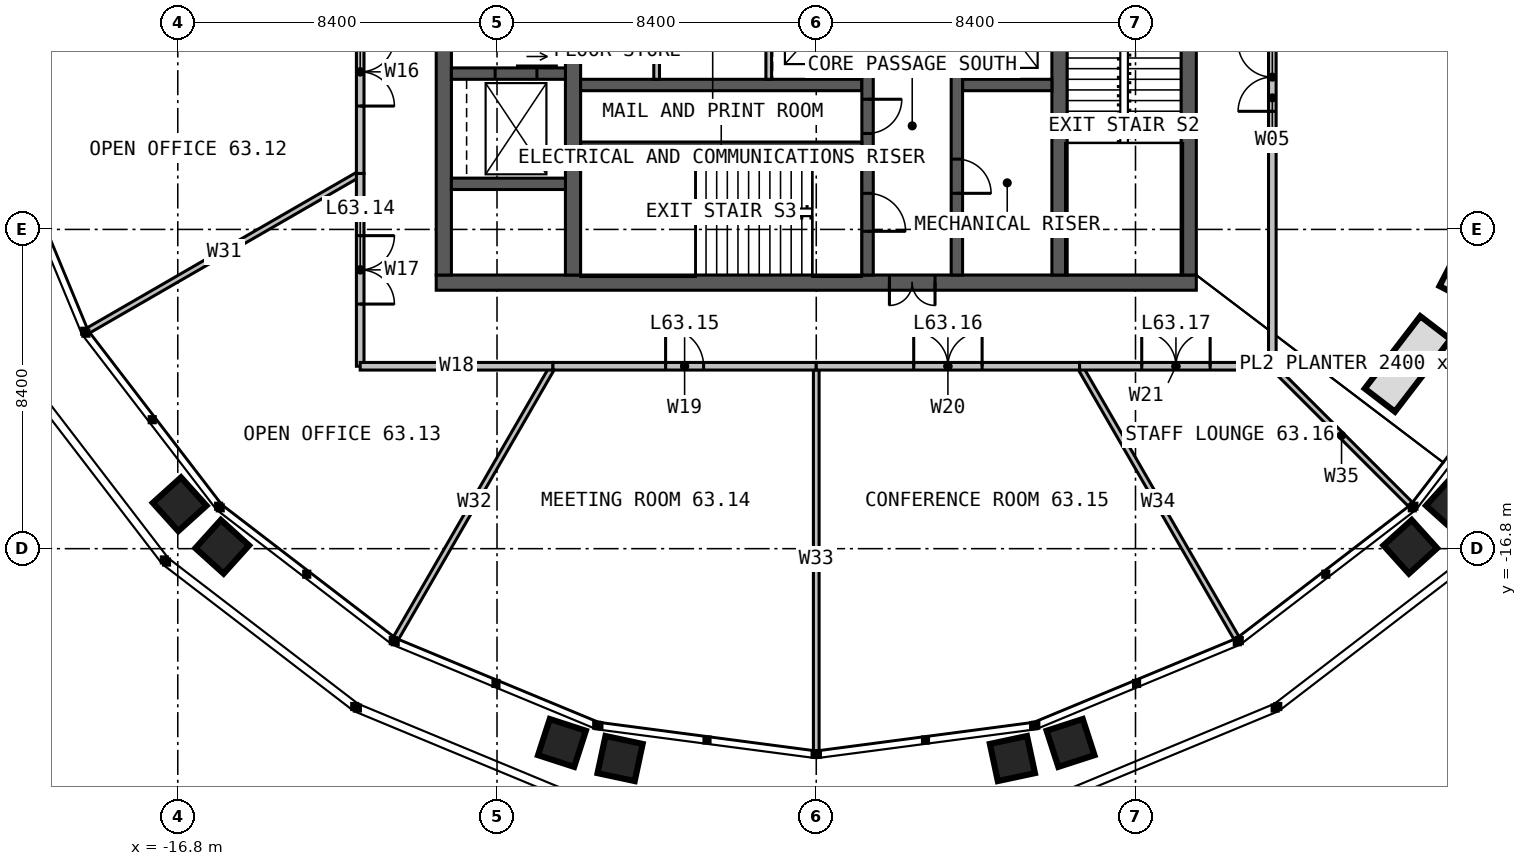
"""IFC4 building model, lengths in metres.
Left out: names, types, materials, properties, quantities, classifications, styles, units other than length and angle.
Written with IfcOpenShell. Run it as: python <this file> out.ifc"""

import sys

from ifc_helpers import new_model, si_unit, direction, frame, frame_2d, origin, place, context, subcontext, project, spatial, rectangle, extrude, element, fill, save


model = new_model("IFC4")
c1 = context("Model", 3, precision=1e-05, world=origin(), true_north=direction((0.0, 1.0)))
c2 = subcontext(c1, "Body", "Model", "MODEL_VIEW")
j1 = project(units=[si_unit("LENGTHUNIT", "METRE"), si_unit("PLANEANGLEUNIT", "RADIAN")], contexts=[c1])
p1 = place(None, origin())
s1 = spatial("IfcSite", under=j1, at=p1, CompositionType="ELEMENT")
p2 = place(p1, origin())
s2 = spatial("IfcBuilding", under=s1, at=p2, CompositionType="ELEMENT")
p3 = place(p2, frame((0.0, 0.0, 260.0)))
s3 = spatial("IfcBuildingStorey", under=s2, at=p3, CompositionType="ELEMENT", Elevation=260.0)
p4 = place(p3, frame((10.0, -9.8, 0.0), z_axis=(0.0, 0.0, 1.0), x_axis=(-1.0, 0.0, 0.0)))
e1 = element("IfcWall", 1, at=p4, inside=s3, PredefinedType="SOLIDWALL", context=c2, shape_type="SweptSolid", body=[
    extrude(rectangle(XDim=20.0, YDim=0.4, at=frame_2d((10.0, 0.0))), origin(), (0.0, 0.0, 1.0), 4.0),
])
p5 = place(p4, frame((6.875, 0.0, 0.0)))
e2 = element("IfcOpeningElement", 2, at=p5, cuts=e1, PredefinedType="OPENING", context=c2, shape_type="SweptSolid", body=[
    extrude(rectangle(XDim=1.2, YDim=2.2, at=frame_2d((0.6, 1.1))), frame((0.0, 0.21, 0.0), z_axis=(0.0, -1.0, 0.0), x_axis=(1.0, 0.0, 0.0)), (0.0, 0.0, 1.0), 0.42),
])
for number, where, z_axis, x_axis in (
    (3, (9.8, -9.6, 0.0), (0.0, 0.0, 1.0), (0.0, 1.0, 0.0)),
    (4, (-9.8, 9.6, 0.0), (0.0, 0.0, 1.0), (0.0, -1.0, 0.0)),
):
    element("IfcWall", number, at=place(p3, frame(where, z_axis=z_axis, x_axis=x_axis)), inside=s3, PredefinedType="SOLIDWALL", context=c2, shape_type="SweptSolid", body=[
        extrude(rectangle(XDim=19.2, YDim=0.4, at=frame_2d((9.6, 0.0))), origin(), (0.0, 0.0, 1.0), 4.0),
    ])
p6 = place(p3, frame((-6.4, -9.6, 0.0), z_axis=(0.0, 0.0, 1.0), x_axis=(0.0, 1.0, 0.0)))
e5 = element("IfcWall", 5, at=p6, inside=s3, PredefinedType="SOLIDWALL", context=c2, shape_type="SweptSolid", body=[
    extrude(rectangle(XDim=19.2, YDim=0.4, at=frame_2d((9.6, 0.0))), origin(), (0.0, 0.0, 1.0), 4.0),
])
p7 = place(p6, frame((9.1, 0.0, 0.0)))
e6 = element("IfcOpeningElement", 6, at=p7, cuts=e5, PredefinedType="OPENING", context=c2, shape_type="SweptSolid", body=[
    extrude(rectangle(XDim=1.0, YDim=2.2, at=frame_2d((0.5, 1.1))), frame((0.0, 0.21, 0.0), z_axis=(0.0, -1.0, 0.0), x_axis=(1.0, 0.0, 0.0)), (0.0, 0.0, 1.0), 0.42),
])
p8 = place(p3, frame((6.4, 9.6, 0.0), z_axis=(0.0, 0.0, 1.0), x_axis=(0.0, -1.0, 0.0)))
e7 = element("IfcWall", 7, at=p8, inside=s3, PredefinedType="SOLIDWALL", context=c2, shape_type="SweptSolid", body=[
    extrude(rectangle(XDim=19.2, YDim=0.4, at=frame_2d((9.6, 0.0))), origin(), (0.0, 0.0, 1.0), 4.0),
])
p9 = place(p8, frame((9.1, 0.0, 0.0)))
e8 = element("IfcOpeningElement", 8, at=p9, cuts=e7, PredefinedType="OPENING", context=c2, shape_type="SweptSolid", body=[
    extrude(rectangle(XDim=1.0, YDim=2.2, at=frame_2d((0.5, 1.1))), frame((0.0, 0.21, 0.0), z_axis=(0.0, -1.0, 0.0), x_axis=(1.0, 0.0, 0.0)), (0.0, 0.0, 1.0), 0.42),
])
p10 = place(p3, frame((-6.2, -4.6, 0.0), z_axis=(0.0, 0.0, 1.0), x_axis=(1.0, 0.0, 0.0)))
e9 = element("IfcWall", 9, at=p10, inside=s3, PredefinedType="SOLIDWALL", context=c2, shape_type="SweptSolid", body=[
    extrude(rectangle(XDim=7.4, YDim=0.3, at=frame_2d((3.7, 0.0))), origin(), (0.0, 0.0, 1.0), 4.0),
])
p11 = place(p3, frame((3.85, -4.6, 0.0), z_axis=(0.0, 0.0, 1.0), x_axis=(1.0, 0.0, 0.0)))
e10 = element("IfcWall", 10, at=p11, inside=s3, PredefinedType="SOLIDWALL", context=c2, shape_type="SweptSolid", body=[
    extrude(rectangle(XDim=2.35, YDim=0.3, at=frame_2d((1.175, 0.0))), origin(), (0.0, 0.0, 1.0), 4.0),
])
p12 = place(p3, frame((1.35, -1.45, 0.0), z_axis=(0.0, 0.0, 1.0), x_axis=(0.0, -1.0, 0.0)))
e11 = element("IfcWall", 11, at=p12, inside=s3, PredefinedType="SOLIDWALL", context=c2, shape_type="SweptSolid", body=[
    extrude(rectangle(XDim=8.15, YDim=0.3, at=frame_2d((4.075, 0.0))), origin(), (0.0, 0.0, 1.0), 4.0),
])
p13 = place(p12, frame((6.0, 0.0, 0.0)))
e12 = element("IfcOpeningElement", 12, at=p13, cuts=e11, PredefinedType="OPENING", context=c2, shape_type="SweptSolid", body=[
    extrude(rectangle(XDim=1.0, YDim=2.2, at=frame_2d((0.5, 1.1))), frame((0.0, 0.16, 0.0), z_axis=(0.0, -1.0, 0.0), x_axis=(1.0, 0.0, 0.0)), (0.0, 0.0, 1.0), 0.32),
])
p14 = place(p12, frame((3.525, 0.0, 0.0)))
e13 = element("IfcOpeningElement", 13, at=p14, cuts=e11, PredefinedType="OPENING", context=c2, shape_type="SweptSolid", body=[
    extrude(rectangle(XDim=0.9, YDim=2.2, at=frame_2d((0.45, 1.1))), frame((0.0, 0.16, 0.0), z_axis=(0.0, -1.0, 0.0), x_axis=(1.0, 0.0, 0.0)), (0.0, 0.0, 1.0), 0.32),
])
p15 = place(p3, frame((3.7, -1.45, 0.0), z_axis=(0.0, 0.0, 1.0), x_axis=(0.0, -1.0, 0.0)))
e14 = element("IfcWall", 14, at=p15, inside=s3, PredefinedType="SOLIDWALL", context=c2, shape_type="SweptSolid", body=[
    extrude(rectangle(XDim=8.15, YDim=0.3, at=frame_2d((4.075, 0.0))), origin(), (0.0, 0.0, 1.0), 4.0),
])
p16 = place(p15, frame((5.1, 0.0, 0.0)))
e15 = element("IfcOpeningElement", 15, at=p16, cuts=e14, PredefinedType="OPENING", context=c2, shape_type="SweptSolid", body=[
    extrude(rectangle(XDim=0.9, YDim=2.2, at=frame_2d((0.45, 1.1))), frame((0.0, 0.16, 0.0), z_axis=(0.0, -1.0, 0.0), x_axis=(1.0, 0.0, 0.0)), (0.0, 0.0, 1.0), 0.32),
])
p17 = place(p3, frame((-6.2, -6.2, 0.0), z_axis=(0.0, 0.0, 1.0), x_axis=(1.0, 0.0, 0.0)))
e16 = element("IfcWall", 16, at=p17, inside=s3, PredefinedType="SOLIDWALL", context=c2, shape_type="SweptSolid", body=[
    extrude(rectangle(XDim=7.4, YDim=0.2, at=frame_2d((3.7, 0.0))), origin(), (0.0, 0.0, 1.0), 4.0),
])
p18 = place(p3, frame((-9.6, -4.3, 0.0), z_axis=(0.0, 0.0, 1.0), x_axis=(1.0, 0.0, 0.0)))
e17 = element("IfcWall", 17, at=p18, inside=s3, PredefinedType="SOLIDWALL", context=c2, shape_type="SweptSolid", body=[
    extrude(rectangle(XDim=3.0, YDim=0.3, at=frame_2d((1.5, 0.0))), origin(), (0.0, 0.0, 1.0), 4.0),
])
p19 = place(p18, frame((1.15, 0.0, 0.0)))
e18 = element("IfcOpeningElement", 18, at=p19, cuts=e17, PredefinedType="OPENING", context=c2, shape_type="SweptSolid", body=[
    extrude(rectangle(XDim=1.1, YDim=2.2, at=frame_2d((0.55, 1.1))), frame((0.0, 0.16, 0.0), z_axis=(0.0, -1.0, 0.0), x_axis=(1.0, 0.0, 0.0)), (0.0, 0.0, 1.0), 0.32),
])
p20 = place(p3, frame((-9.6, -7.2, 0.0), z_axis=(0.0, 0.0, 1.0), x_axis=(1.0, 0.0, 0.0)))
e19 = element("IfcWall", 19, at=p20, inside=s3, PredefinedType="SOLIDWALL", context=c2, shape_type="SweptSolid", body=[
    extrude(rectangle(XDim=3.0, YDim=0.3, at=frame_2d((1.5, 0.0))), origin(), (0.0, 0.0, 1.0), 4.0),
])
for number, where, z_axis, x_axis in (
    (20, (-4.2, -1.75, 0.0), (0.0, 0.0, 1.0), (0.0, -1.0, 0.0)),
    (21, (-1.25, -1.75, 0.0), (0.0, 0.0, 1.0), (0.0, -1.0, 0.0)),
):
    element("IfcWall", number, at=place(p3, frame(where, z_axis=z_axis, x_axis=x_axis)), inside=s3, PredefinedType="PARTITIONING", context=c2, shape_type="SweptSolid", body=[
        extrude(rectangle(XDim=2.7, YDim=0.15, at=frame_2d((1.35, 0.0))), origin(), (0.0, 0.0, 1.0), 3.75),
    ])
p21 = place(p3, frame((12.0, -12.0, 0.0), z_axis=(0.0, 0.0, 1.0), x_axis=(0.707106781187, -0.707106781187, 0.0)))
e22 = element("IfcWall", 22, at=p21, inside=s3, PredefinedType="PARTITIONING", context=c2, shape_type="SweptSolid", body=[
    extrude(rectangle(XDim=5.152, YDim=0.15, at=frame_2d((2.576, 0.0))), origin(), (0.0, 0.0, 1.0), 2.79),
])
for number, where, z_axis, x_axis in (
    (23, (-12.0, -6.928, 0.0), (0.0, 0.0, 1.0), (-0.866, -0.5, 0.0)),
    (24, (-6.928, -12.0, 0.0), (0.0, 0.0, 1.0), (-0.5, -0.866, 0.0)),
):
    element("IfcWall", number, at=place(p3, frame(where, z_axis=z_axis, x_axis=x_axis)), inside=s3, PredefinedType="PARTITIONING", context=c2, shape_type="SweptSolid", body=[
        extrude(rectangle(XDim=8.266, YDim=0.15, at=frame_2d((4.133, 0.0))), origin(), (0.0, 0.0, 1.0), 2.79),
    ])
p22 = place(p3, frame((0.0, -12.0, 0.0), z_axis=(0.0, 0.0, 1.0), x_axis=(0.0, -1.0, 0.0)))
e25 = element("IfcWall", 25, at=p22, inside=s3, PredefinedType="PARTITIONING", context=c2, shape_type="SweptSolid", body=[
    extrude(rectangle(XDim=10.122, YDim=0.15, at=frame_2d((5.061, 0.0))), origin(), (0.0, 0.0, 1.0), 2.79),
])
p23 = place(p3, frame((6.928, -12.0, 0.0), z_axis=(0.0, 0.0, 1.0), x_axis=(0.499989206474, -0.86603163534, 0.0)))
e26 = element("IfcWall", 26, at=p23, inside=s3, PredefinedType="PARTITIONING", context=c2, shape_type="SweptSolid", body=[
    extrude(rectangle(XDim=8.266, YDim=0.15, at=frame_2d((4.133, 0.0))), origin(), (0.0, 0.0, 1.0), 2.79),
])
p24 = place(p3, frame((12.0, -12.0, 0.0), z_axis=(0.0, 0.0, 1.0), x_axis=(0.0, 1.0, 0.0)))
e27 = element("IfcWall", 27, at=p24, inside=s3, PredefinedType="PARTITIONING", context=c2, shape_type="SweptSolid", body=[
    extrude(rectangle(XDim=14.123, YDim=0.2, at=frame_2d((7.061, 0.0))), origin(), (0.0, 0.0, 1.0), 3.2),
])
p25 = place(p24, frame((6.708, 0.0, 0.0)))
e28 = element("IfcOpeningElement", 28, at=p25, cuts=e27, PredefinedType="OPENING", context=c2, shape_type="SweptSolid", body=[
    extrude(rectangle(XDim=1.8, YDim=2.2, at=frame_2d((0.9, 1.1))), frame((0.0, 0.11, 0.0), z_axis=(0.0, -1.0, 0.0), x_axis=(1.0, 0.0, 0.0)), (0.0, 0.0, 1.0), 0.22),
])
p26 = place(p3, frame((-12.0, -1.58, 0.0), z_axis=(0.0, 0.0, 1.0), x_axis=(0.0, -1.0, 0.0)))
e29 = element("IfcWall", 29, at=p26, inside=s3, PredefinedType="PARTITIONING", context=c2, shape_type="SweptSolid", body=[
    extrude(rectangle(XDim=5.348, YDim=0.2, at=frame_2d((2.674, 0.0))), origin(), (0.0, 0.0, 1.0), 3.8),
])
p27 = place(p26, frame((1.774, 0.0, 0.0)))
e30 = element("IfcOpeningElement", 30, at=p27, cuts=e29, PredefinedType="OPENING", context=c2, shape_type="SweptSolid", body=[
    extrude(rectangle(XDim=1.8, YDim=2.2, at=frame_2d((0.9, 1.1))), frame((0.0, 0.11, 0.0), z_axis=(0.0, -1.0, 0.0), x_axis=(1.0, 0.0, 0.0)), (0.0, 0.0, 1.0), 0.22),
])
p28 = place(p3, frame((-12.0, -6.928, 0.0), z_axis=(0.0, 0.0, 1.0), x_axis=(0.0, -1.0, 0.0)))
e31 = element("IfcWall", 31, at=p28, inside=s3, PredefinedType="PARTITIONING", context=c2, shape_type="SweptSolid", body=[
    extrude(rectangle(XDim=5.072, YDim=0.2, at=frame_2d((2.536, 0.0))), origin(), (0.0, 0.0, 1.0), 3.8),
])
p29 = place(p28, frame((1.636, 0.0, 0.0)))
e32 = element("IfcOpeningElement", 32, at=p29, cuts=e31, PredefinedType="OPENING", context=c2, shape_type="SweptSolid", body=[
    extrude(rectangle(XDim=1.8, YDim=2.2, at=frame_2d((0.9, 1.1))), frame((0.0, 0.11, 0.0), z_axis=(0.0, -1.0, 0.0), x_axis=(1.0, 0.0, 0.0)), (0.0, 0.0, 1.0), 0.22),
])
p30 = place(p3, frame((-12.0, -12.0, 0.0), z_axis=(0.0, 0.0, 1.0), x_axis=(1.0, 0.0, 0.0)))
e33 = element("IfcWall", 33, at=p30, inside=s3, PredefinedType="PARTITIONING", context=c2, shape_type="SweptSolid", body=[
    extrude(rectangle(XDim=5.072, YDim=0.2, at=frame_2d((2.536, 0.0))), origin(), (0.0, 0.0, 1.0), 3.8),
])
p31 = place(p3, frame((-6.928, -12.0, 0.0), z_axis=(0.0, 0.0, 1.0), x_axis=(1.0, 0.0, 0.0)))
e34 = element("IfcWall", 34, at=p31, inside=s3, PredefinedType="PARTITIONING", context=c2, shape_type="SweptSolid", body=[
    extrude(rectangle(XDim=6.928, YDim=0.2, at=frame_2d((3.464, 0.0))), origin(), (0.0, 0.0, 1.0), 3.8),
])
p32 = place(p31, frame((2.964, 0.0, 0.0)))
e35 = element("IfcOpeningElement", 35, at=p32, cuts=e34, PredefinedType="OPENING", context=c2, shape_type="SweptSolid", body=[
    extrude(rectangle(XDim=1.0, YDim=2.2, at=frame_2d((0.5, 1.1))), frame((0.0, 0.11, 0.0), z_axis=(0.0, -1.0, 0.0), x_axis=(1.0, 0.0, 0.0)), (0.0, 0.0, 1.0), 0.22),
])
p33 = place(p3, frame((0.0, -12.0, 0.0), z_axis=(0.0, 0.0, 1.0), x_axis=(1.0, 0.0, 0.0)))
e36 = element("IfcWall", 36, at=p33, inside=s3, PredefinedType="PARTITIONING", context=c2, shape_type="SweptSolid", body=[
    extrude(rectangle(XDim=6.928, YDim=0.2, at=frame_2d((3.464, 0.0))), origin(), (0.0, 0.0, 1.0), 3.8),
])
p34 = place(p33, frame((2.564, 0.0, 0.0)))
e37 = element("IfcOpeningElement", 37, at=p34, cuts=e36, PredefinedType="OPENING", context=c2, shape_type="SweptSolid", body=[
    extrude(rectangle(XDim=1.8, YDim=2.2, at=frame_2d((0.9, 1.1))), frame((0.0, 0.11, 0.0), z_axis=(0.0, -1.0, 0.0), x_axis=(1.0, 0.0, 0.0)), (0.0, 0.0, 1.0), 0.22),
])
p35 = place(p3, frame((6.928, -12.0, 0.0), z_axis=(0.0, 0.0, 1.0), x_axis=(1.0, 0.0, 0.0)))
e38 = element("IfcWall", 38, at=p35, inside=s3, PredefinedType="PARTITIONING", context=c2, shape_type="SweptSolid", body=[
    extrude(rectangle(XDim=5.072, YDim=0.2, at=frame_2d((2.536, 0.0))), origin(), (0.0, 0.0, 1.0), 3.8),
])
p36 = place(p35, frame((1.636, 0.0, 0.0)))
e39 = element("IfcOpeningElement", 39, at=p36, cuts=e38, PredefinedType="OPENING", context=c2, shape_type="SweptSolid", body=[
    extrude(rectangle(XDim=1.8, YDim=2.2, at=frame_2d((0.9, 1.1))), frame((0.0, 0.11, 0.0), z_axis=(0.0, -1.0, 0.0), x_axis=(1.0, 0.0, 0.0)), (0.0, 0.0, 1.0), 0.22),
])
p37 = place(p5, origin())
e40 = element("IfcDoor", 40, at=p37, inside=s3, OperationType="DOUBLE_DOOR_SINGLE_SWING", PredefinedType="DOOR", context=c2, shape_type="SweptSolid", body=[
    extrude(rectangle(XDim=1.2, YDim=2.2, at=frame_2d((0.6, 1.1))), frame((0.0, 0.025, 0.0), z_axis=(0.0, -1.0, 0.0), x_axis=(1.0, 0.0, 0.0)), (0.0, 0.0, 1.0), 0.05),
])
fill(e2, e40)
p38 = place(p13, origin())
e41 = element("IfcDoor", 41, at=p38, inside=s3, OperationType="SINGLE_SWING_RIGHT", PredefinedType="DOOR", context=c2, shape_type="SweptSolid", body=[
    extrude(rectangle(XDim=1.0, YDim=2.2, at=frame_2d((0.5, 1.1))), frame((0.0, 0.025, 0.0), z_axis=(0.0, -1.0, 0.0), x_axis=(1.0, 0.0, 0.0)), (0.0, 0.0, 1.0), 0.05),
])
fill(e12, e41)
p39 = place(p14, origin())
e42 = element("IfcDoor", 42, at=p39, inside=s3, OperationType="SINGLE_SWING_LEFT", PredefinedType="DOOR", context=c2, shape_type="SweptSolid", body=[
    extrude(rectangle(XDim=0.9, YDim=2.2, at=frame_2d((0.45, 1.1))), frame((0.0, 0.025, 0.0), z_axis=(0.0, -1.0, 0.0), x_axis=(1.0, 0.0, 0.0)), (0.0, 0.0, 1.0), 0.05),
])
fill(e13, e42)
p40 = place(p16, origin())
e43 = element("IfcDoor", 43, at=p40, inside=s3, OperationType="SINGLE_SWING_RIGHT", PredefinedType="DOOR", context=c2, shape_type="SweptSolid", body=[
    extrude(rectangle(XDim=0.9, YDim=2.2, at=frame_2d((0.45, 1.1))), frame((0.0, 0.025, 0.0), z_axis=(0.0, -1.0, 0.0), x_axis=(1.0, 0.0, 0.0)), (0.0, 0.0, 1.0), 0.05),
])
fill(e15, e43)
p41 = place(p19, origin())
e44 = element("IfcDoor", 44, at=p41, inside=s3, OperationType="SLIDING_TO_LEFT", PredefinedType="DOOR", context=c2, shape_type="SweptSolid", body=[
    extrude(rectangle(XDim=1.1, YDim=2.2, at=frame_2d((0.55, 1.1))), frame((0.0, 0.025, 0.0), z_axis=(0.0, -1.0, 0.0), x_axis=(1.0, 0.0, 0.0)), (0.0, 0.0, 1.0), 0.05),
])
fill(e18, e44)
p42 = place(p25, origin())
e45 = element("IfcDoor", 45, at=p42, inside=s3, OperationType="DOUBLE_DOOR_SINGLE_SWING", PredefinedType="DOOR", context=c2, shape_type="SweptSolid", body=[
    extrude(rectangle(XDim=1.8, YDim=2.2, at=frame_2d((0.9, 1.1))), frame((0.0, 0.025, 0.0), z_axis=(0.0, -1.0, 0.0), x_axis=(1.0, 0.0, 0.0)), (0.0, 0.0, 1.0), 0.05),
])
fill(e28, e45)
p43 = place(p27, origin())
e46 = element("IfcDoor", 46, at=p43, inside=s3, OperationType="DOUBLE_DOOR_SINGLE_SWING", PredefinedType="DOOR", context=c2, shape_type="SweptSolid", body=[
    extrude(rectangle(XDim=1.8, YDim=2.2, at=frame_2d((0.9, 1.1))), frame((0.0, 0.025, 0.0), z_axis=(0.0, -1.0, 0.0), x_axis=(1.0, 0.0, 0.0)), (0.0, 0.0, 1.0), 0.05),
])
fill(e30, e46)
p44 = place(p29, origin())
e47 = element("IfcDoor", 47, at=p44, inside=s3, OperationType="DOUBLE_DOOR_SINGLE_SWING", PredefinedType="DOOR", context=c2, shape_type="SweptSolid", body=[
    extrude(rectangle(XDim=1.8, YDim=2.2, at=frame_2d((0.9, 1.1))), frame((0.0, 0.025, 0.0), z_axis=(0.0, -1.0, 0.0), x_axis=(1.0, 0.0, 0.0)), (0.0, 0.0, 1.0), 0.05),
])
fill(e32, e47)
p45 = place(p32, origin())
e48 = element("IfcDoor", 48, at=p45, inside=s3, OperationType="SINGLE_SWING_LEFT", PredefinedType="DOOR", context=c2, shape_type="SweptSolid", body=[
    extrude(rectangle(XDim=1.0, YDim=2.2, at=frame_2d((0.5, 1.1))), frame((0.0, 0.025, 0.0), z_axis=(0.0, -1.0, 0.0), x_axis=(1.0, 0.0, 0.0)), (0.0, 0.0, 1.0), 0.05),
])
fill(e35, e48)
p46 = place(p34, origin())
e49 = element("IfcDoor", 49, at=p46, inside=s3, OperationType="DOUBLE_DOOR_SINGLE_SWING", PredefinedType="DOOR", context=c2, shape_type="SweptSolid", body=[
    extrude(rectangle(XDim=1.8, YDim=2.2, at=frame_2d((0.9, 1.1))), frame((0.0, 0.025, 0.0), z_axis=(0.0, -1.0, 0.0), x_axis=(1.0, 0.0, 0.0)), (0.0, 0.0, 1.0), 0.05),
])
fill(e37, e49)
p47 = place(p36, origin())
e50 = element("IfcDoor", 50, at=p47, inside=s3, OperationType="DOUBLE_DOOR_SINGLE_SWING", PredefinedType="DOOR", context=c2, shape_type="SweptSolid", body=[
    extrude(rectangle(XDim=1.8, YDim=2.2, at=frame_2d((0.9, 1.1))), frame((0.0, 0.025, 0.0), z_axis=(0.0, -1.0, 0.0), x_axis=(1.0, 0.0, 0.0)), (0.0, 0.0, 1.0), 0.05),
])
fill(e39, e50)
save(model, sys.argv[1])
